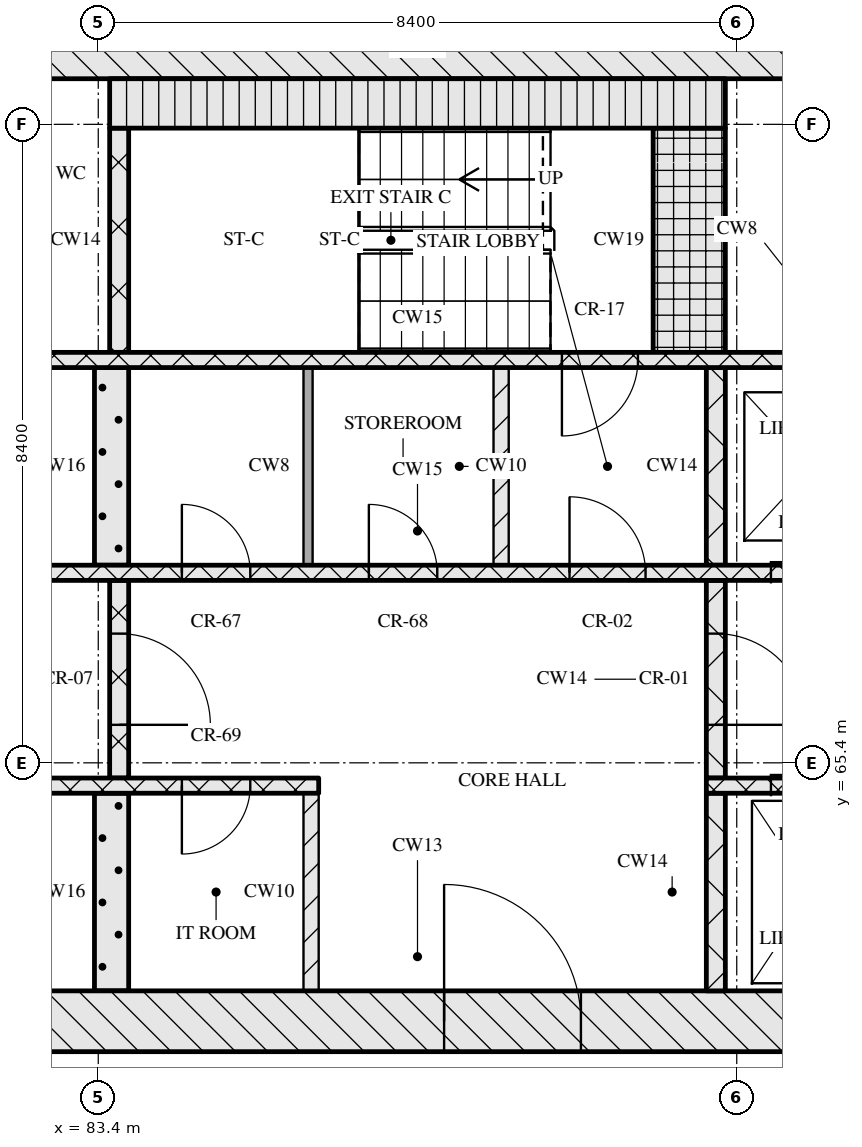
"""IFC4 building model, lengths in metres.
Left out: names, types, materials, properties, quantities, classifications, styles, units other than length and angle.
Written with IfcOpenShell. Run it as: python <this file> out.ifc"""

import sys

from ifc_helpers import new_model, si_unit, direction, frame, frame_2d, origin, place, context, subcontext, project, spatial, rectangle, extrude, element, fill, save


model = new_model("IFC4")
c1 = context("Model", 3, precision=1e-05, world=origin(), true_north=direction((0.0, 1.0)))
c2 = subcontext(c1, "Body", "Model", "MODEL_VIEW")
j1 = project(units=[si_unit("LENGTHUNIT", "METRE"), si_unit("PLANEANGLEUNIT", "RADIAN")], contexts=[c1])
p1 = place(None, origin())
s1 = spatial("IfcSite", under=j1, at=p1, CompositionType="ELEMENT")
p2 = place(p1, origin())
s2 = spatial("IfcBuilding", under=s1, at=p2, CompositionType="ELEMENT")
p3 = place(p2, frame((0.0, 0.0, 147.45)))
s3 = spatial("IfcBuildingStorey", under=s2, at=p3, CompositionType="ELEMENT", Elevation=147.45)
p4 = place(p3, frame((67.0, 62.0, 0.0), z_axis=(0.0, 0.0, 1.0), x_axis=(1.0, 0.0, 0.0)))
e1 = element("IfcWall", 1, at=p4, inside=s3, PredefinedType="SOLIDWALL", context=c2, shape_type="SweptSolid", body=[
    extrude(rectangle(XDim=41.2, YDim=0.8, at=frame_2d((20.6, 0.0))), origin(), (0.0, 0.0, 1.0), 3.32),
])
p5 = place(p4, frame((20.95, 0.0, 0.0)))
e2 = element("IfcOpeningElement", 2, at=p5, cuts=e1, PredefinedType="OPENING", context=c2, shape_type="SweptSolid", body=[
    extrude(rectangle(XDim=1.8, YDim=2.1, at=frame_2d((0.9, 1.05))), frame((0.0, 0.41, 0.0), z_axis=(0.0, -1.0, 0.0), x_axis=(1.0, 0.0, 0.0)), (0.0, 0.0, 1.0), 0.82),
])
p6 = place(p3, frame((67.0, 74.8, 0.0), z_axis=(0.0, 0.0, 1.0), x_axis=(1.0, 0.0, 0.0)))
e3 = element("IfcWall", 3, at=p6, inside=s3, PredefinedType="SOLIDWALL", context=c2, shape_type="SweptSolid", body=[
    extrude(rectangle(XDim=41.2, YDim=0.8, at=frame_2d((20.6, 0.0))), origin(), (0.0, 0.0, 1.0), 3.32),
])
p7 = place(p3, frame((83.575, 62.4, 0.0), z_axis=(0.0, 0.0, 1.0), x_axis=(0.0, 1.0, 0.0)))
e4 = element("IfcWall", 4, at=p7, inside=s3, PredefinedType="SOLIDWALL", context=c2, shape_type="SweptSolid", body=[
    extrude(rectangle(XDim=2.6, YDim=0.45, at=frame_2d((1.3, 0.0))), origin(), (0.0, 0.0, 1.0), 3.32),
])
p8 = place(p3, frame((86.2, 62.4, 0.0), z_axis=(0.0, 0.0, 1.0), x_axis=(0.0, 1.0, 0.0)))
e5 = element("IfcWall", 5, at=p8, inside=s3, PredefinedType="PARTITIONING", context=c2, shape_type="SweptSolid", body=[
    extrude(rectangle(XDim=2.6, YDim=0.2, at=frame_2d((1.3, 0.0))), origin(), (0.0, 0.0, 1.0), 3.32),
])
p9 = place(p3, frame((91.525, 62.4, 0.0), z_axis=(0.0, 0.0, 1.0), x_axis=(0.0, 1.0, 0.0)))
e6 = element("IfcWall", 6, at=p9, inside=s3, PredefinedType="SOLIDWALL", context=c2, shape_type="SweptSolid", body=[
    extrude(rectangle(XDim=2.6, YDim=0.25, at=frame_2d((1.3, 0.0))), origin(), (0.0, 0.0, 1.0), 3.32),
])
p10 = place(p3, frame((67.8, 65.1, 0.0), z_axis=(0.0, 0.0, 1.0), x_axis=(1.0, 0.0, 0.0)))
e7 = element("IfcWall", 7, at=p10, inside=s3, PredefinedType="SOLIDWALL", context=c2, shape_type="SweptSolid", body=[
    extrude(rectangle(XDim=18.5, YDim=0.2, at=frame_2d((9.25, 0.0))), origin(), (0.0, 0.0, 1.0), 3.32),
])
p11 = place(p10, frame((7.27, 0.0, 0.0)))
e8 = element("IfcOpeningElement", 8, at=p11, cuts=e7, PredefinedType="OPENING", context=c2, shape_type="SweptSolid", body=[
    extrude(rectangle(XDim=0.9, YDim=2.1, at=frame_2d((0.45, 1.05))), frame((0.0, 0.11, 0.0), z_axis=(0.0, -1.0, 0.0), x_axis=(1.0, 0.0, 0.0)), (0.0, 0.0, 1.0), 0.22),
])
p12 = place(p10, frame((11.45, 0.0, 0.0)))
e9 = element("IfcOpeningElement", 9, at=p12, cuts=e7, PredefinedType="OPENING", context=c2, shape_type="SweptSolid", body=[
    extrude(rectangle(XDim=0.9, YDim=2.1, at=frame_2d((0.45, 1.05))), frame((0.0, 0.11, 0.0), z_axis=(0.0, -1.0, 0.0), x_axis=(1.0, 0.0, 0.0)), (0.0, 0.0, 1.0), 0.22),
])
p13 = place(p10, frame((16.7, 0.0, 0.0)))
e10 = element("IfcOpeningElement", 10, at=p13, cuts=e7, PredefinedType="OPENING", context=c2, shape_type="SweptSolid", body=[
    extrude(rectangle(XDim=0.9, YDim=2.1, at=frame_2d((0.45, 1.05))), frame((0.0, 0.11, 0.0), z_axis=(0.0, -1.0, 0.0), x_axis=(1.0, 0.0, 0.0)), (0.0, 0.0, 1.0), 0.22),
])
p14 = place(p3, frame((91.4, 65.1, 0.0), z_axis=(0.0, 0.0, 1.0), x_axis=(1.0, 0.0, 0.0)))
e11 = element("IfcWall", 11, at=p14, inside=s3, PredefinedType="SOLIDWALL", context=c2, shape_type="SweptSolid", body=[
    extrude(rectangle(XDim=16.0, YDim=0.2, at=frame_2d((8.0, 0.0))), origin(), (0.0, 0.0, 1.0), 3.32),
])
p15 = place(p14, frame((0.85, 0.0, 0.0)))
e12 = element("IfcOpeningElement", 12, at=p15, cuts=e11, PredefinedType="OPENING", context=c2, shape_type="SweptSolid", body=[
    extrude(rectangle(XDim=1.1, YDim=2.1, at=frame_2d((0.55, 1.05))), frame((0.0, 0.11, 0.0), z_axis=(0.0, -1.0, 0.0), x_axis=(1.0, 0.0, 0.0)), (0.0, 0.0, 1.0), 0.22),
])
p16 = place(p14, frame((3.35, 0.0, 0.0)))
e13 = element("IfcOpeningElement", 13, at=p16, cuts=e11, PredefinedType="OPENING", context=c2, shape_type="SweptSolid", body=[
    extrude(rectangle(XDim=1.1, YDim=2.1, at=frame_2d((0.55, 1.05))), frame((0.0, 0.11, 0.0), z_axis=(0.0, -1.0, 0.0), x_axis=(1.0, 0.0, 0.0)), (0.0, 0.0, 1.0), 0.22),
])
p17 = place(p14, frame((5.85, 0.0, 0.0)))
e14 = element("IfcOpeningElement", 14, at=p17, cuts=e11, PredefinedType="OPENING", context=c2, shape_type="SweptSolid", body=[
    extrude(rectangle(XDim=1.1, YDim=2.1, at=frame_2d((0.55, 1.05))), frame((0.0, 0.11, 0.0), z_axis=(0.0, -1.0, 0.0), x_axis=(1.0, 0.0, 0.0)), (0.0, 0.0, 1.0), 0.22),
])
p18 = place(p14, frame((7.83, 0.0, 0.0)))
e15 = element("IfcOpeningElement", 15, at=p18, cuts=e11, PredefinedType="OPENING", context=c2, shape_type="SweptSolid", body=[
    extrude(rectangle(XDim=0.9, YDim=2.1, at=frame_2d((0.45, 1.05))), frame((0.0, 0.11, 0.0), z_axis=(0.0, -1.0, 0.0), x_axis=(1.0, 0.0, 0.0)), (0.0, 0.0, 1.0), 0.22),
])
p19 = place(p3, frame((83.675, 65.2, 0.0), z_axis=(0.0, 0.0, 1.0), x_axis=(0.0, 1.0, 0.0)))
e16 = element("IfcWall", 16, at=p19, inside=s3, PredefinedType="SOLIDWALL", context=c2, shape_type="SweptSolid", body=[
    extrude(rectangle(XDim=2.6, YDim=0.25, at=frame_2d((1.3, 0.0))), origin(), (0.0, 0.0, 1.0), 3.32),
])
p20 = place(p19, frame((0.7, 0.0, 0.0)))
e17 = element("IfcOpeningElement", 17, at=p20, cuts=e16, PredefinedType="OPENING", context=c2, shape_type="SweptSolid", body=[
    extrude(rectangle(XDim=1.2, YDim=2.1, at=frame_2d((0.6, 1.05))), frame((0.0, 0.135, 0.0), z_axis=(0.0, -1.0, 0.0), x_axis=(1.0, 0.0, 0.0)), (0.0, 0.0, 1.0), 0.27),
])
p21 = place(p3, frame((91.525, 65.2, 0.0), z_axis=(0.0, 0.0, 1.0), x_axis=(0.0, 1.0, 0.0)))
e18 = element("IfcWall", 18, at=p21, inside=s3, PredefinedType="SOLIDWALL", context=c2, shape_type="SweptSolid", body=[
    extrude(rectangle(XDim=2.6, YDim=0.25, at=frame_2d((1.3, 0.0))), origin(), (0.0, 0.0, 1.0), 3.32),
])
p22 = place(p21, frame((0.7, 0.0, 0.0)))
e19 = element("IfcOpeningElement", 19, at=p22, cuts=e18, PredefinedType="OPENING", context=c2, shape_type="SweptSolid", body=[
    extrude(rectangle(XDim=1.2, YDim=2.1, at=frame_2d((0.6, 1.05))), frame((0.0, 0.135, 0.0), z_axis=(0.0, -1.0, 0.0), x_axis=(1.0, 0.0, 0.0)), (0.0, 0.0, 1.0), 0.27),
])
p23 = place(p3, frame((76.05, 67.9, 0.0), z_axis=(0.0, 0.0, 1.0), x_axis=(1.0, 0.0, 0.0)))
e20 = element("IfcWall", 20, at=p23, inside=s3, PredefinedType="SOLIDWALL", context=c2, shape_type="SweptSolid", body=[
    extrude(rectangle(XDim=23.1, YDim=0.2, at=frame_2d((11.55, 0.0))), origin(), (0.0, 0.0, 1.0), 3.32),
])
p24 = place(p23, frame((1.4, 0.0, 0.0)))
e21 = element("IfcOpeningElement", 21, at=p24, cuts=e20, PredefinedType="OPENING", context=c2, shape_type="SweptSolid", body=[
    extrude(rectangle(XDim=0.9, YDim=2.1, at=frame_2d((0.45, 1.05))), frame((0.0, 0.11, 0.0), z_axis=(0.0, -1.0, 0.0), x_axis=(1.0, 0.0, 0.0)), (0.0, 0.0, 1.0), 0.22),
])
p25 = place(p23, frame((5.11, 0.0, 0.0)))
e22 = element("IfcOpeningElement", 22, at=p25, cuts=e20, PredefinedType="OPENING", context=c2, shape_type="SweptSolid", body=[
    extrude(rectangle(XDim=0.9, YDim=2.1, at=frame_2d((0.45, 1.05))), frame((0.0, 0.11, 0.0), z_axis=(0.0, -1.0, 0.0), x_axis=(1.0, 0.0, 0.0)), (0.0, 0.0, 1.0), 0.22),
])
p26 = place(p23, frame((8.45, 0.0, 0.0)))
e23 = element("IfcOpeningElement", 23, at=p26, cuts=e20, PredefinedType="OPENING", context=c2, shape_type="SweptSolid", body=[
    extrude(rectangle(XDim=0.9, YDim=2.1, at=frame_2d((0.45, 1.05))), frame((0.0, 0.11, 0.0), z_axis=(0.0, -1.0, 0.0), x_axis=(1.0, 0.0, 0.0)), (0.0, 0.0, 1.0), 0.22),
])
p27 = place(p23, frame((10.91, 0.0, 0.0)))
e24 = element("IfcOpeningElement", 24, at=p27, cuts=e20, PredefinedType="OPENING", context=c2, shape_type="SweptSolid", body=[
    extrude(rectangle(XDim=0.9, YDim=2.1, at=frame_2d((0.45, 1.05))), frame((0.0, 0.11, 0.0), z_axis=(0.0, -1.0, 0.0), x_axis=(1.0, 0.0, 0.0)), (0.0, 0.0, 1.0), 0.22),
])
p28 = place(p23, frame((13.55, 0.0, 0.0)))
e25 = element("IfcOpeningElement", 25, at=p28, cuts=e20, PredefinedType="OPENING", context=c2, shape_type="SweptSolid", body=[
    extrude(rectangle(XDim=1.0, YDim=2.1, at=frame_2d((0.5, 1.05))), frame((0.0, 0.11, 0.0), z_axis=(0.0, -1.0, 0.0), x_axis=(1.0, 0.0, 0.0)), (0.0, 0.0, 1.0), 0.22),
])
p29 = place(p23, frame((16.2, 0.0, 0.0)))
e26 = element("IfcOpeningElement", 26, at=p29, cuts=e20, PredefinedType="OPENING", context=c2, shape_type="SweptSolid", body=[
    extrude(rectangle(XDim=1.1, YDim=2.1, at=frame_2d((0.55, 1.05))), frame((0.0, 0.11, 0.0), z_axis=(0.0, -1.0, 0.0), x_axis=(1.0, 0.0, 0.0)), (0.0, 0.0, 1.0), 0.22),
])
p30 = place(p23, frame((18.7, 0.0, 0.0)))
e27 = element("IfcOpeningElement", 27, at=p30, cuts=e20, PredefinedType="OPENING", context=c2, shape_type="SweptSolid", body=[
    extrude(rectangle(XDim=1.1, YDim=2.1, at=frame_2d((0.55, 1.05))), frame((0.0, 0.11, 0.0), z_axis=(0.0, -1.0, 0.0), x_axis=(1.0, 0.0, 0.0)), (0.0, 0.0, 1.0), 0.22),
])
p31 = place(p23, frame((21.2, 0.0, 0.0)))
e28 = element("IfcOpeningElement", 28, at=p31, cuts=e20, PredefinedType="OPENING", context=c2, shape_type="SweptSolid", body=[
    extrude(rectangle(XDim=1.1, YDim=2.1, at=frame_2d((0.55, 1.05))), frame((0.0, 0.11, 0.0), z_axis=(0.0, -1.0, 0.0), x_axis=(1.0, 0.0, 0.0)), (0.0, 0.0, 1.0), 0.22),
])
p32 = place(p3, frame((83.575, 68.0, 0.0), z_axis=(0.0, 0.0, 1.0), x_axis=(0.0, 1.0, 0.0)))
e29 = element("IfcWall", 29, at=p32, inside=s3, PredefinedType="SOLIDWALL", context=c2, shape_type="SweptSolid", body=[
    extrude(rectangle(XDim=2.6, YDim=0.45, at=frame_2d((1.3, 0.0))), origin(), (0.0, 0.0, 1.0), 3.32),
])
p33 = place(p3, frame((86.16, 68.0, 0.0), z_axis=(0.0, 0.0, 1.0), x_axis=(0.0, 1.0, 0.0)))
e30 = element("IfcWall", 30, at=p33, inside=s3, PredefinedType="PARTITIONING", context=c2, shape_type="SweptSolid", body=[
    extrude(rectangle(XDim=2.6, YDim=0.12, at=frame_2d((1.3, 0.0))), origin(), (0.0, 0.0, 1.0), 3.32),
])
p34 = place(p3, frame((88.7, 68.0, 0.0), z_axis=(0.0, 0.0, 1.0), x_axis=(0.0, 1.0, 0.0)))
e31 = element("IfcWall", 31, at=p34, inside=s3, PredefinedType="PARTITIONING", context=c2, shape_type="SweptSolid", body=[
    extrude(rectangle(XDim=2.6, YDim=0.2, at=frame_2d((1.3, 0.0))), origin(), (0.0, 0.0, 1.0), 3.32),
])
p35 = place(p3, frame((91.525, 68.0, 0.0), z_axis=(0.0, 0.0, 1.0), x_axis=(0.0, 1.0, 0.0)))
e32 = element("IfcWall", 32, at=p35, inside=s3, PredefinedType="SOLIDWALL", context=c2, shape_type="SweptSolid", body=[
    extrude(rectangle(XDim=2.6, YDim=0.25, at=frame_2d((1.3, 0.0))), origin(), (0.0, 0.0, 1.0), 3.32),
])
p36 = place(p3, frame((67.8, 70.7, 0.0), z_axis=(0.0, 0.0, 1.0), x_axis=(1.0, 0.0, 0.0)))
e33 = element("IfcWall", 33, at=p36, inside=s3, PredefinedType="SOLIDWALL", context=c2, shape_type="SweptSolid", body=[
    extrude(rectangle(XDim=39.6, YDim=0.2, at=frame_2d((19.8, 0.0))), origin(), (0.0, 0.0, 1.0), 3.32),
])
p37 = place(p36, frame((0.65, 0.0, 0.0)))
e34 = element("IfcOpeningElement", 34, at=p37, cuts=e33, PredefinedType="OPENING", context=c2, shape_type="SweptSolid", body=[
    extrude(rectangle(XDim=1.1, YDim=2.1, at=frame_2d((0.55, 1.05))), frame((0.0, 0.11, 0.0), z_axis=(0.0, -1.0, 0.0), x_axis=(1.0, 0.0, 0.0)), (0.0, 0.0, 1.0), 0.22),
])
p38 = place(p36, frame((3.25, 0.0, 0.0)))
e35 = element("IfcOpeningElement", 35, at=p38, cuts=e33, PredefinedType="OPENING", context=c2, shape_type="SweptSolid", body=[
    extrude(rectangle(XDim=1.1, YDim=2.1, at=frame_2d((0.55, 1.05))), frame((0.0, 0.11, 0.0), z_axis=(0.0, -1.0, 0.0), x_axis=(1.0, 0.0, 0.0)), (0.0, 0.0, 1.0), 0.22),
])
p39 = place(p36, frame((5.9, 0.0, 0.0)))
e36 = element("IfcOpeningElement", 36, at=p39, cuts=e33, PredefinedType="OPENING", context=c2, shape_type="SweptSolid", body=[
    extrude(rectangle(XDim=1.0, YDim=2.1, at=frame_2d((0.5, 1.05))), frame((0.0, 0.11, 0.0), z_axis=(0.0, -1.0, 0.0), x_axis=(1.0, 0.0, 0.0)), (0.0, 0.0, 1.0), 0.22),
])
p40 = place(p36, frame((21.7, 0.0, 0.0)))
e37 = element("IfcOpeningElement", 37, at=p40, cuts=e33, PredefinedType="OPENING", context=c2, shape_type="SweptSolid", body=[
    extrude(rectangle(XDim=1.0, YDim=2.1, at=frame_2d((0.5, 1.05))), frame((0.0, 0.11, 0.0), z_axis=(0.0, -1.0, 0.0), x_axis=(1.0, 0.0, 0.0)), (0.0, 0.0, 1.0), 0.22),
])
p41 = place(p36, frame((32.7, 0.0, 0.0)))
e38 = element("IfcOpeningElement", 38, at=p41, cuts=e33, PredefinedType="OPENING", context=c2, shape_type="SweptSolid", body=[
    extrude(rectangle(XDim=1.0, YDim=2.1, at=frame_2d((0.5, 1.05))), frame((0.0, 0.11, 0.0), z_axis=(0.0, -1.0, 0.0), x_axis=(1.0, 0.0, 0.0)), (0.0, 0.0, 1.0), 0.22),
])
p42 = place(p36, frame((35.25, 0.0, 0.0)))
e39 = element("IfcOpeningElement", 39, at=p42, cuts=e33, PredefinedType="OPENING", context=c2, shape_type="SweptSolid", body=[
    extrude(rectangle(XDim=1.1, YDim=2.1, at=frame_2d((0.55, 1.05))), frame((0.0, 0.11, 0.0), z_axis=(0.0, -1.0, 0.0), x_axis=(1.0, 0.0, 0.0)), (0.0, 0.0, 1.0), 0.22),
])
p43 = place(p36, frame((37.85, 0.0, 0.0)))
e40 = element("IfcOpeningElement", 40, at=p43, cuts=e33, PredefinedType="OPENING", context=c2, shape_type="SweptSolid", body=[
    extrude(rectangle(XDim=1.1, YDim=2.1, at=frame_2d((0.55, 1.05))), frame((0.0, 0.11, 0.0), z_axis=(0.0, -1.0, 0.0), x_axis=(1.0, 0.0, 0.0)), (0.0, 0.0, 1.0), 0.22),
])
p44 = place(p3, frame((83.675, 70.8, 0.0), z_axis=(0.0, 0.0, 1.0), x_axis=(0.0, 1.0, 0.0)))
e41 = element("IfcWall", 41, at=p44, inside=s3, PredefinedType="SOLIDWALL", context=c2, shape_type="SweptSolid", body=[
    extrude(rectangle(XDim=2.95, YDim=0.25, at=frame_2d((1.475, 0.0))), origin(), (0.0, 0.0, 1.0), 3.32),
])
p45 = place(p3, frame((91.175, 70.8, 0.0), z_axis=(0.0, 0.0, 1.0), x_axis=(0.0, 1.0, 0.0)))
e42 = element("IfcWall", 42, at=p45, inside=s3, PredefinedType="SOLIDWALL", context=c2, shape_type="SweptSolid", body=[
    extrude(rectangle(XDim=2.95, YDim=0.95, at=frame_2d((1.475, 0.0))), origin(), (0.0, 0.0, 1.0), 3.32),
])
p46 = place(p3, frame((83.55, 74.075, 0.0), z_axis=(0.0, 0.0, 1.0), x_axis=(1.0, 0.0, 0.0)))
e43 = element("IfcWall", 43, at=p46, inside=s3, PredefinedType="SOLIDWALL", context=c2, shape_type="SweptSolid", body=[
    extrude(rectangle(XDim=8.1, YDim=0.65, at=frame_2d((4.05, 0.0))), origin(), (0.0, 0.0, 1.0), 3.32),
])
p47 = place(p5, origin())
e44 = element("IfcDoor", 44, at=p47, inside=s3, OperationType="DOUBLE_DOOR_SINGLE_SWING", PredefinedType="DOOR", context=c2, shape_type="SweptSolid", body=[
    extrude(rectangle(XDim=1.8, YDim=2.1, at=frame_2d((0.9, 1.05))), frame((0.0, 0.025, 0.0), z_axis=(0.0, -1.0, 0.0), x_axis=(1.0, 0.0, 0.0)), (0.0, 0.0, 1.0), 0.05),
])
fill(e2, e44)
p48 = place(p13, origin())
e45 = element("IfcDoor", 45, at=p48, inside=s3, OperationType="SINGLE_SWING_RIGHT", PredefinedType="DOOR", context=c2, shape_type="SweptSolid", body=[
    extrude(rectangle(XDim=0.9, YDim=2.1, at=frame_2d((0.45, 1.05))), frame((0.0, 0.025, 0.0), z_axis=(0.0, -1.0, 0.0), x_axis=(1.0, 0.0, 0.0)), (0.0, 0.0, 1.0), 0.05),
])
fill(e10, e45)
p49 = place(p15, origin())
e46 = element("IfcDoor", 46, at=p49, inside=s3, OperationType="SLIDING_TO_LEFT", PredefinedType="DOOR", context=c2, shape_type="SweptSolid", body=[
    extrude(rectangle(XDim=1.1, YDim=2.1, at=frame_2d((0.55, 1.05))), frame((0.0, 0.025, 0.0), z_axis=(0.0, -1.0, 0.0), x_axis=(1.0, 0.0, 0.0)), (0.0, 0.0, 1.0), 0.05),
])
fill(e12, e46)
p50 = place(p20, origin())
e47 = element("IfcDoor", 47, at=p50, inside=s3, OperationType="SINGLE_SWING_RIGHT", PredefinedType="DOOR", context=c2, shape_type="SweptSolid", body=[
    extrude(rectangle(XDim=1.2, YDim=2.1, at=frame_2d((0.6, 1.05))), frame((0.0, 0.025, 0.0), z_axis=(0.0, -1.0, 0.0), x_axis=(1.0, 0.0, 0.0)), (0.0, 0.0, 1.0), 0.05),
])
fill(e17, e47)
p51 = place(p22, origin())
e48 = element("IfcDoor", 48, at=p51, inside=s3, OperationType="SINGLE_SWING_RIGHT", PredefinedType="DOOR", context=c2, shape_type="SweptSolid", body=[
    extrude(rectangle(XDim=1.2, YDim=2.1, at=frame_2d((0.6, 1.05))), frame((0.0, 0.025, 0.0), z_axis=(0.0, -1.0, 0.0), x_axis=(1.0, 0.0, 0.0)), (0.0, 0.0, 1.0), 0.05),
])
fill(e19, e48)
p52 = place(p26, origin())
e49 = element("IfcDoor", 49, at=p52, inside=s3, OperationType="SINGLE_SWING_LEFT", PredefinedType="DOOR", context=c2, shape_type="SweptSolid", body=[
    extrude(rectangle(XDim=0.9, YDim=2.1, at=frame_2d((0.45, 1.05))), frame((0.0, 0.025, 0.0), z_axis=(0.0, -1.0, 0.0), x_axis=(1.0, 0.0, 0.0)), (0.0, 0.0, 1.0), 0.05),
])
fill(e23, e49)
p53 = place(p27, origin())
e50 = element("IfcDoor", 50, at=p53, inside=s3, OperationType="SINGLE_SWING_LEFT", PredefinedType="DOOR", context=c2, shape_type="SweptSolid", body=[
    extrude(rectangle(XDim=0.9, YDim=2.1, at=frame_2d((0.45, 1.05))), frame((0.0, 0.025, 0.0), z_axis=(0.0, -1.0, 0.0), x_axis=(1.0, 0.0, 0.0)), (0.0, 0.0, 1.0), 0.05),
])
fill(e24, e50)
p54 = place(p28, origin())
e51 = element("IfcDoor", 51, at=p54, inside=s3, OperationType="SINGLE_SWING_LEFT", PredefinedType="DOOR", context=c2, shape_type="SweptSolid", body=[
    extrude(rectangle(XDim=1.0, YDim=2.1, at=frame_2d((0.5, 1.05))), frame((0.0, 0.025, 0.0), z_axis=(0.0, -1.0, 0.0), x_axis=(1.0, 0.0, 0.0)), (0.0, 0.0, 1.0), 0.05),
])
fill(e25, e51)
p55 = place(p29, origin())
e52 = element("IfcDoor", 52, at=p55, inside=s3, OperationType="SLIDING_TO_RIGHT", PredefinedType="DOOR", context=c2, shape_type="SweptSolid", body=[
    extrude(rectangle(XDim=1.1, YDim=2.1, at=frame_2d((0.55, 1.05))), frame((0.0, 0.025, 0.0), z_axis=(0.0, -1.0, 0.0), x_axis=(1.0, 0.0, 0.0)), (0.0, 0.0, 1.0), 0.05),
])
fill(e26, e52)
p56 = place(p40, origin())
e53 = element("IfcDoor", 53, at=p56, inside=s3, OperationType="SINGLE_SWING_RIGHT", PredefinedType="DOOR", context=c2, shape_type="SweptSolid", body=[
    extrude(rectangle(XDim=1.0, YDim=2.1, at=frame_2d((0.5, 1.05))), frame((0.0, 0.025, 0.0), z_axis=(0.0, -1.0, 0.0), x_axis=(1.0, 0.0, 0.0)), (0.0, 0.0, 1.0), 0.05),
])
fill(e37, e53)
save(model, sys.argv[1])
